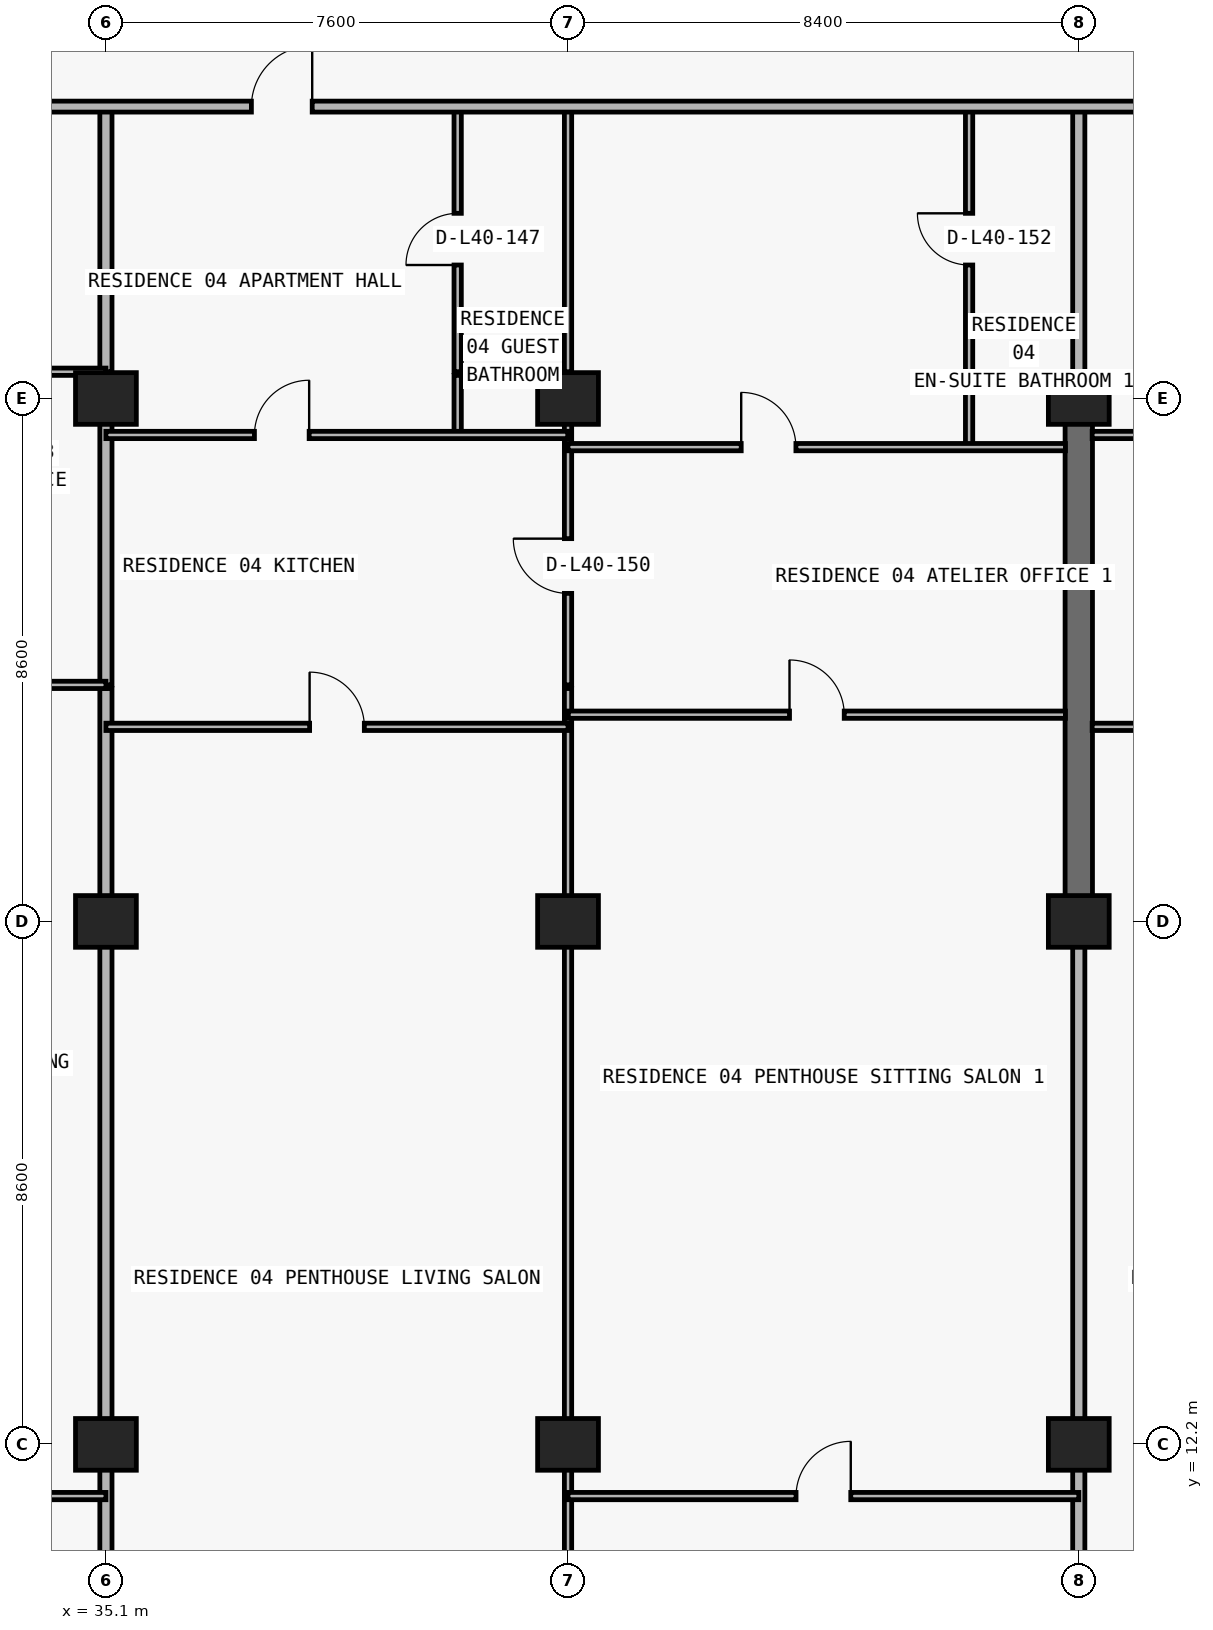
"""IFC4 building model, lengths in metres.
Left out: names, types, materials, properties, quantities, classifications, styles, units other than length and angle.
Written with IfcOpenShell. Run it as: python <this file> out.ifc"""

import sys

from ifc_helpers import new_model, si_unit, direction, frame, frame_2d, origin, origin_2d, place, context, subcontext, project, spatial, rectangle, extrude, element, fill, save


model = new_model("IFC4")
c1 = context("Model", 3, precision=1e-05, world=origin(), true_north=direction((0.0, 1.0)))
c2 = subcontext(c1, "Body", "Model", "MODEL_VIEW")
j1 = project(units=[si_unit("LENGTHUNIT", "METRE"), si_unit("PLANEANGLEUNIT", "RADIAN")], contexts=[c1])
p1 = place(None, origin())
s1 = spatial("IfcSite", under=j1, at=p1, CompositionType="ELEMENT")
p2 = place(p1, origin())
s2 = spatial("IfcBuilding", under=s1, at=p2, CompositionType="ELEMENT")
p3 = place(p2, frame((0.0, 0.0, 145.5)))
s3 = spatial("IfcBuildingStorey", under=s2, at=p3, CompositionType="ELEMENT", Elevation=145.5)
for number, where, z_axis, x_axis in (
    (1, (35.1, 12.2, 0.0), (0.0, 0.0, 1.0), (1.0, 0.0, 0.0)),
    (2, (42.7, 12.2, 0.0), (0.0, 0.0, 1.0), (1.0, 0.0, 0.0)),
    (3, (51.1, 12.2, 0.0), (0.0, 0.0, 1.0), (1.0, 0.0, 0.0)),
    (4, (35.1, 20.8, 0.0), (0.0, 0.0, 1.0), (1.0, 0.0, 0.0)),
    (5, (42.7, 20.8, 0.0), (0.0, 0.0, 1.0), (1.0, 0.0, 0.0)),
    (6, (51.1, 20.8, 0.0), (0.0, 0.0, 1.0), (1.0, 0.0, 0.0)),
    (7, (35.1, 29.4, 0.0), (0.0, 0.0, 1.0), (1.0, 0.0, 0.0)),
    (8, (42.7, 29.4, 0.0), (0.0, 0.0, 1.0), (1.0, 0.0, 0.0)),
    (9, (51.1, 29.4, 0.0), (0.0, 0.0, 1.0), (1.0, 0.0, 0.0)),
):
    element("IfcColumn", number, at=place(p3, frame(where, z_axis=z_axis, x_axis=x_axis)), inside=s3, PredefinedType="COLUMN", context=c2, shape_type="SweptSolid", body=[
        extrude(rectangle(XDim=1.0, YDim=0.85, at=origin_2d()), origin(), (0.0, 0.0, 1.0), 3.05),
    ])
p4 = place(p3, frame((51.1, 20.8, 0.0), z_axis=(0.0, 0.0, 1.0), x_axis=(0.0, 1.0, 0.0)))
e10 = element("IfcWall", 10, at=p4, inside=s3, PredefinedType="SHEAR", context=c2, shape_type="SweptSolid", body=[
    extrude(rectangle(XDim=8.6, YDim=0.45, at=frame_2d((4.3, 0.0))), origin(), (0.0, 0.0, 1.0), 3.05),
])
p5 = place(p3, frame((35.1, 8.84, 0.0), z_axis=(0.0, 0.0, 1.0), x_axis=(0.0, 1.0, 0.0)))
e11 = element("IfcWall", 11, at=p5, inside=s3, PredefinedType="PARTITIONING", context=c2, shape_type="SweptSolid", body=[
    extrude(rectangle(XDim=15.79, YDim=0.2, at=frame_2d((7.895, 0.0))), origin(), (0.0, 0.0, 1.0), 2.174),
])
p6 = place(p3, frame((35.1, 24.69, 0.0), z_axis=(0.0, 0.0, 1.0), x_axis=(0.0, 1.0, 0.0)))
e12 = element("IfcWall", 12, at=p6, inside=s3, PredefinedType="PARTITIONING", context=c2, shape_type="SweptSolid", body=[
    extrude(rectangle(XDim=5.09, YDim=0.2, at=frame_2d((2.545, 0.0))), origin(), (0.0, 0.0, 1.0), 2.174),
])
p7 = place(p3, frame((35.1, 29.84, 0.0), z_axis=(0.0, 0.0, 1.0), x_axis=(0.0, 1.0, 0.0)))
e13 = element("IfcWall", 13, at=p7, inside=s3, PredefinedType="PARTITIONING", context=c2, shape_type="SweptSolid", body=[
    extrude(rectangle(XDim=4.36, YDim=0.2, at=frame_2d((2.18, 0.0))), origin(), (0.0, 0.0, 1.0), 2.174),
])
p8 = place(p3, frame((40.885, 28.8, 0.0), z_axis=(0.0, 0.0, 1.0), x_axis=(0.0, 1.0, 0.0)))
e14 = element("IfcWall", 14, at=p8, inside=s3, PredefinedType="PARTITIONING", context=c2, shape_type="SweptSolid", body=[
    extrude(rectangle(XDim=0.98, YDim=0.12, at=frame_2d((0.49, 0.0))), origin(), (0.0, 0.0, 1.0), 3.05),
])
p9 = place(p3, frame((40.885, 29.84, 0.0), z_axis=(0.0, 0.0, 1.0), x_axis=(0.0, 1.0, 0.0)))
e15 = element("IfcWall", 15, at=p9, inside=s3, PredefinedType="PARTITIONING", context=c2, shape_type="SweptSolid", body=[
    extrude(rectangle(XDim=4.36, YDim=0.12, at=frame_2d((2.18, 0.0))), origin(), (0.0, 0.0, 1.0), 3.05),
])
p10 = place(p9, frame((1.755, 0.0, 0.0)))
e16 = element("IfcOpeningElement", 16, at=p10, cuts=e15, PredefinedType="OPENING", context=c2, shape_type="SweptSolid", body=[
    extrude(rectangle(XDim=0.85, YDim=2.1, at=frame_2d((0.425, 1.05))), frame((0.0, 0.07, 0.0), z_axis=(0.0, -1.0, 0.0), x_axis=(1.0, 0.0, 0.0)), (0.0, 0.0, 1.0), 0.14),
])
p11 = place(p3, frame((42.7, 8.84, 0.0), z_axis=(0.0, 0.0, 1.0), x_axis=(0.0, 1.0, 0.0)))
e17 = element("IfcWall", 17, at=p11, inside=s3, PredefinedType="PARTITIONING", context=c2, shape_type="SweptSolid", body=[
    extrude(rectangle(XDim=15.79, YDim=0.12, at=frame_2d((7.895, 0.0))), origin(), (0.0, 0.0, 1.0), 2.174),
])
p12 = place(p3, frame((42.7, 24.69, 0.0), z_axis=(0.0, 0.0, 1.0), x_axis=(0.0, 1.0, 0.0)))
e18 = element("IfcWall", 18, at=p12, inside=s3, PredefinedType="PARTITIONING", context=c2, shape_type="SweptSolid", body=[
    extrude(rectangle(XDim=5.09, YDim=0.12, at=frame_2d((2.545, 0.0))), origin(), (0.0, 0.0, 1.0), 2.174),
])
p13 = place(p12, frame((1.505, 0.0, 0.0)))
e19 = element("IfcOpeningElement", 19, at=p13, cuts=e18, PredefinedType="OPENING", context=c2, shape_type="SweptSolid", body=[
    extrude(rectangle(XDim=0.9, YDim=2.124, at=frame_2d((0.45, 1.062))), frame((0.0, 0.07, 0.0), z_axis=(0.0, -1.0, 0.0), x_axis=(1.0, 0.0, 0.0)), (0.0, 0.0, 1.0), 0.14),
])
p14 = place(p3, frame((42.7, 29.84, 0.0), z_axis=(0.0, 0.0, 1.0), x_axis=(0.0, 1.0, 0.0)))
e20 = element("IfcWall", 20, at=p14, inside=s3, PredefinedType="PARTITIONING", context=c2, shape_type="SweptSolid", body=[
    extrude(rectangle(XDim=4.36, YDim=0.12, at=frame_2d((2.18, 0.0))), origin(), (0.0, 0.0, 1.0), 2.174),
])
p15 = place(p3, frame((49.296, 28.6, 0.0), z_axis=(0.0, 0.0, 1.0), x_axis=(0.0, 1.0, 0.0)))
e21 = element("IfcWall", 21, at=p15, inside=s3, PredefinedType="PARTITIONING", context=c2, shape_type="SweptSolid", body=[
    extrude(rectangle(XDim=1.18, YDim=0.12, at=frame_2d((0.59, 0.0))), origin(), (0.0, 0.0, 1.0), 3.05),
])
p16 = place(p3, frame((49.296, 29.84, 0.0), z_axis=(0.0, 0.0, 1.0), x_axis=(0.0, 1.0, 0.0)))
e22 = element("IfcWall", 22, at=p16, inside=s3, PredefinedType="PARTITIONING", context=c2, shape_type="SweptSolid", body=[
    extrude(rectangle(XDim=4.36, YDim=0.12, at=frame_2d((2.18, 0.0))), origin(), (0.0, 0.0, 1.0), 3.05),
])
p17 = place(p16, frame((1.755, 0.0, 0.0)))
e23 = element("IfcOpeningElement", 23, at=p17, cuts=e22, PredefinedType="OPENING", context=c2, shape_type="SweptSolid", body=[
    extrude(rectangle(XDim=0.85, YDim=2.1, at=frame_2d((0.425, 1.05))), frame((0.0, 0.07, 0.0), z_axis=(0.0, -1.0, 0.0), x_axis=(1.0, 0.0, 0.0)), (0.0, 0.0, 1.0), 0.14),
])
p18 = place(p3, frame((51.1, 8.84, 0.0), z_axis=(0.0, 0.0, 1.0), x_axis=(0.0, 1.0, 0.0)))
e24 = element("IfcWall", 24, at=p18, inside=s3, PredefinedType="PARTITIONING", context=c2, shape_type="SweptSolid", body=[
    extrude(rectangle(XDim=11.955, YDim=0.2, at=frame_2d((5.978, 0.0))), origin(), (0.0, 0.0, 1.0), 2.174),
])
p19 = place(p3, frame((51.1, 29.405, 0.0), z_axis=(0.0, 0.0, 1.0), x_axis=(0.0, 1.0, 0.0)))
e25 = element("IfcWall", 25, at=p19, inside=s3, PredefinedType="PARTITIONING", context=c2, shape_type="SweptSolid", body=[
    extrude(rectangle(XDim=0.375, YDim=0.2, at=frame_2d((0.188, 0.0))), origin(), (0.0, 0.0, 1.0), 3.05),
])
p20 = place(p3, frame((51.1, 29.84, 0.0), z_axis=(0.0, 0.0, 1.0), x_axis=(0.0, 1.0, 0.0)))
e26 = element("IfcWall", 26, at=p20, inside=s3, PredefinedType="PARTITIONING", context=c2, shape_type="SweptSolid", body=[
    extrude(rectangle(XDim=4.36, YDim=0.2, at=frame_2d((2.18, 0.0))), origin(), (0.0, 0.0, 1.0), 2.335),
])
p21 = place(p3, frame((30.648, 11.35, 0.0), z_axis=(0.0, 0.0, 1.0), x_axis=(1.0, 0.0, 0.0)))
e27 = element("IfcWall", 27, at=p21, inside=s3, PredefinedType="PARTITIONING", context=c2, shape_type="SweptSolid", body=[
    extrude(rectangle(XDim=4.452, YDim=0.12, at=frame_2d((2.226, 0.0))), origin(), (0.0, 0.0, 1.0), 3.05),
])
p22 = place(p21, frame((1.776, 0.0, 0.0)))
e28 = element("IfcOpeningElement", 28, at=p22, cuts=e27, PredefinedType="OPENING", context=c2, shape_type="SweptSolid", body=[
    extrude(rectangle(XDim=0.9, YDim=2.15, at=frame_2d((0.45, 1.075))), frame((0.0, 0.07, 0.0), z_axis=(0.0, -1.0, 0.0), x_axis=(1.0, 0.0, 0.0)), (0.0, 0.0, 1.0), 0.14),
])
p23 = place(p3, frame((42.7, 11.35, 0.0), z_axis=(0.0, 0.0, 1.0), x_axis=(1.0, 0.0, 0.0)))
e29 = element("IfcWall", 29, at=p23, inside=s3, PredefinedType="PARTITIONING", context=c2, shape_type="SweptSolid", body=[
    extrude(rectangle(XDim=8.4, YDim=0.12, at=frame_2d((4.2, 0.0))), origin(), (0.0, 0.0, 1.0), 3.05),
])
p24 = place(p23, frame((3.75, 0.0, 0.0)))
e30 = element("IfcOpeningElement", 30, at=p24, cuts=e29, PredefinedType="OPENING", context=c2, shape_type="SweptSolid", body=[
    extrude(rectangle(XDim=0.9, YDim=2.15, at=frame_2d((0.45, 1.075))), frame((0.0, 0.07, 0.0), z_axis=(0.0, -1.0, 0.0), x_axis=(1.0, 0.0, 0.0)), (0.0, 0.0, 1.0), 0.14),
])
p25 = place(p3, frame((35.1, 24.0, 0.0), z_axis=(0.0, 0.0, 1.0), x_axis=(1.0, 0.0, 0.0)))
e31 = element("IfcWall", 31, at=p25, inside=s3, PredefinedType="PARTITIONING", context=c2, shape_type="SweptSolid", body=[
    extrude(rectangle(XDim=7.6, YDim=0.12, at=frame_2d((3.8, 0.0))), origin(), (0.0, 0.0, 1.0), 3.05),
])
p26 = place(p25, frame((3.35, 0.0, 0.0)))
e32 = element("IfcOpeningElement", 32, at=p26, cuts=e31, PredefinedType="OPENING", context=c2, shape_type="SweptSolid", body=[
    extrude(rectangle(XDim=0.9, YDim=2.15, at=frame_2d((0.45, 1.075))), frame((0.0, 0.07, 0.0), z_axis=(0.0, -1.0, 0.0), x_axis=(1.0, 0.0, 0.0)), (0.0, 0.0, 1.0), 0.14),
])
p27 = place(p3, frame((51.32, 24.0, 0.0), z_axis=(0.0, 0.0, 1.0), x_axis=(1.0, 0.0, 0.0)))
e33 = element("IfcWall", 33, at=p27, inside=s3, PredefinedType="PARTITIONING", context=c2, shape_type="SweptSolid", body=[
    extrude(rectangle(XDim=8.18, YDim=0.12, at=frame_2d((4.09, 0.0))), origin(), (0.0, 0.0, 1.0), 3.05),
])
p28 = place(p27, frame((1.33, 0.0, 0.0)))
e34 = element("IfcOpeningElement", 34, at=p28, cuts=e33, PredefinedType="OPENING", context=c2, shape_type="SweptSolid", body=[
    extrude(rectangle(XDim=0.9, YDim=2.15, at=frame_2d((0.45, 1.075))), frame((0.0, 0.07, 0.0), z_axis=(0.0, -1.0, 0.0), x_axis=(1.0, 0.0, 0.0)), (0.0, 0.0, 1.0), 0.14),
])
p29 = place(p3, frame((42.705, 24.2, 0.0), z_axis=(0.0, 0.0, 1.0), x_axis=(1.0, 0.0, 0.0)))
e35 = element("IfcWall", 35, at=p29, inside=s3, PredefinedType="PARTITIONING", context=c2, shape_type="SweptSolid", body=[
    extrude(rectangle(XDim=8.175, YDim=0.12, at=frame_2d((4.087, 0.0))), origin(), (0.0, 0.0, 1.0), 3.05),
])
p30 = place(p29, frame((3.637, 0.0, 0.0)))
e36 = element("IfcOpeningElement", 36, at=p30, cuts=e35, PredefinedType="OPENING", context=c2, shape_type="SweptSolid", body=[
    extrude(rectangle(XDim=0.9, YDim=2.15, at=frame_2d((0.45, 1.075))), frame((0.0, 0.07, 0.0), z_axis=(0.0, -1.0, 0.0), x_axis=(1.0, 0.0, 0.0)), (0.0, 0.0, 1.0), 0.14),
])
p31 = place(p3, frame((26.92, 24.69, 0.0), z_axis=(0.0, 0.0, 1.0), x_axis=(1.0, 0.0, 0.0)))
e37 = element("IfcWall", 37, at=p31, inside=s3, PredefinedType="PARTITIONING", context=c2, shape_type="SweptSolid", body=[
    extrude(rectangle(XDim=8.18, YDim=0.12, at=frame_2d((4.09, 0.0))), origin(), (0.0, 0.0, 1.0), 3.05),
])
p32 = place(p31, frame((1.414, 0.0, 0.0)))
e38 = element("IfcOpeningElement", 38, at=p32, cuts=e37, PredefinedType="OPENING", context=c2, shape_type="SweptSolid", body=[
    extrude(rectangle(XDim=0.9, YDim=2.15, at=frame_2d((0.45, 1.075))), frame((0.0, 0.07, 0.0), z_axis=(0.0, -1.0, 0.0), x_axis=(1.0, 0.0, 0.0)), (0.0, 0.0, 1.0), 0.14),
])
p33 = place(p31, frame((5.673, 0.0, 0.0)))
e39 = element("IfcOpeningElement", 39, at=p33, cuts=e37, PredefinedType="OPENING", context=c2, shape_type="SweptSolid", body=[
    extrude(rectangle(XDim=0.9, YDim=2.15, at=frame_2d((0.45, 1.075))), frame((0.0, 0.07, 0.0), z_axis=(0.0, -1.0, 0.0), x_axis=(1.0, 0.0, 0.0)), (0.0, 0.0, 1.0), 0.14),
])
p34 = place(p3, frame((42.7, 28.6, 0.0), z_axis=(0.0, 0.0, 1.0), x_axis=(1.0, 0.0, 0.0)))
e40 = element("IfcWall", 40, at=p34, inside=s3, PredefinedType="PARTITIONING", context=c2, shape_type="SweptSolid", body=[
    extrude(rectangle(XDim=8.18, YDim=0.12, at=frame_2d((4.09, 0.0))), origin(), (0.0, 0.0, 1.0), 3.05),
])
p35 = place(p34, frame((2.848, 0.0, 0.0)))
e41 = element("IfcOpeningElement", 41, at=p35, cuts=e40, PredefinedType="OPENING", context=c2, shape_type="SweptSolid", body=[
    extrude(rectangle(XDim=0.9, YDim=2.15, at=frame_2d((0.45, 1.075))), frame((0.0, 0.07, 0.0), z_axis=(0.0, -1.0, 0.0), x_axis=(1.0, 0.0, 0.0)), (0.0, 0.0, 1.0), 0.14),
])
p36 = place(p3, frame((35.1, 28.8, 0.0), z_axis=(0.0, 0.0, 1.0), x_axis=(1.0, 0.0, 0.0)))
e42 = element("IfcWall", 42, at=p36, inside=s3, PredefinedType="PARTITIONING", context=c2, shape_type="SweptSolid", body=[
    extrude(rectangle(XDim=7.595, YDim=0.12, at=frame_2d((3.797, 0.0))), origin(), (0.0, 0.0, 1.0), 3.05),
])
p37 = place(p36, frame((2.442, 0.0, 0.0)))
e43 = element("IfcOpeningElement", 43, at=p37, cuts=e42, PredefinedType="OPENING", context=c2, shape_type="SweptSolid", body=[
    extrude(rectangle(XDim=0.9, YDim=2.15, at=frame_2d((0.45, 1.075))), frame((0.0, 0.07, 0.0), z_axis=(0.0, -1.0, 0.0), x_axis=(1.0, 0.0, 0.0)), (0.0, 0.0, 1.0), 0.14),
])
p38 = place(p3, frame((51.32, 28.8, 0.0), z_axis=(0.0, 0.0, 1.0), x_axis=(1.0, 0.0, 0.0)))
e44 = element("IfcWall", 44, at=p38, inside=s3, PredefinedType="PARTITIONING", context=c2, shape_type="SweptSolid", body=[
    extrude(rectangle(XDim=8.18, YDim=0.12, at=frame_2d((4.09, 0.0))), origin(), (0.0, 0.0, 1.0), 3.05),
])
p39 = place(p38, frame((1.33, 0.0, 0.0)))
e45 = element("IfcOpeningElement", 45, at=p39, cuts=e44, PredefinedType="OPENING", context=c2, shape_type="SweptSolid", body=[
    extrude(rectangle(XDim=0.9, YDim=2.15, at=frame_2d((0.45, 1.075))), frame((0.0, 0.07, 0.0), z_axis=(0.0, -1.0, 0.0), x_axis=(1.0, 0.0, 0.0)), (0.0, 0.0, 1.0), 0.14),
])
p40 = place(p3, frame((26.7, 29.84, 0.0), z_axis=(0.0, 0.0, 1.0), x_axis=(1.0, 0.0, 0.0)))
e46 = element("IfcWall", 46, at=p40, inside=s3, PredefinedType="PARTITIONING", context=c2, shape_type="SweptSolid", body=[
    extrude(rectangle(XDim=8.4, YDim=0.12, at=frame_2d((4.2, 0.0))), origin(), (0.0, 0.0, 1.0), 3.05),
])
p41 = place(p40, frame((1.693, 0.0, 0.0)))
e47 = element("IfcOpeningElement", 47, at=p41, cuts=e46, PredefinedType="OPENING", context=c2, shape_type="SweptSolid", body=[
    extrude(rectangle(XDim=0.9, YDim=2.15, at=frame_2d((0.45, 1.075))), frame((0.0, 0.07, 0.0), z_axis=(0.0, -1.0, 0.0), x_axis=(1.0, 0.0, 0.0)), (0.0, 0.0, 1.0), 0.14),
])
p42 = place(p3, frame((26.7, 34.2, 0.0), z_axis=(0.0, 0.0, 1.0), x_axis=(1.0, 0.0, 0.0)))
e48 = element("IfcWall", 48, at=p42, inside=s3, PredefinedType="PARTITIONING", context=c2, shape_type="SweptSolid", body=[
    extrude(rectangle(XDim=32.8, YDim=0.18, at=frame_2d((16.4, 0.0))), origin(), (0.0, 0.0, 1.0), 3.05),
])
p43 = place(p42, frame((2.519, 0.0, 0.0)))
e49 = element("IfcOpeningElement", 49, at=p43, cuts=e48, PredefinedType="OPENING", context=c2, shape_type="SweptSolid", body=[
    extrude(rectangle(XDim=1.0, YDim=2.2, at=frame_2d((0.5, 1.1))), frame((0.0, 0.1, 0.0), z_axis=(0.0, -1.0, 0.0), x_axis=(1.0, 0.0, 0.0)), (0.0, 0.0, 1.0), 0.2),
])
p44 = place(p42, frame((10.792, 0.0, 0.0)))
e50 = element("IfcOpeningElement", 50, at=p44, cuts=e48, PredefinedType="OPENING", context=c2, shape_type="SweptSolid", body=[
    extrude(rectangle(XDim=1.0, YDim=2.2, at=frame_2d((0.5, 1.1))), frame((0.0, 0.1, 0.0), z_axis=(0.0, -1.0, 0.0), x_axis=(1.0, 0.0, 0.0)), (0.0, 0.0, 1.0), 0.2),
])
p45 = place(p42, frame((27.146, 0.0, 0.0)))
e51 = element("IfcOpeningElement", 51, at=p45, cuts=e48, PredefinedType="OPENING", context=c2, shape_type="SweptSolid", body=[
    extrude(rectangle(XDim=1.0, YDim=2.2, at=frame_2d((0.5, 1.1))), frame((0.0, 0.1, 0.0), z_axis=(0.0, -1.0, 0.0), x_axis=(1.0, 0.0, 0.0)), (0.0, 0.0, 1.0), 0.2),
])
p46 = place(p44, origin())
e52 = element("IfcDoor", 52, at=p46, inside=s3, OperationType="SINGLE_SWING_RIGHT", PredefinedType="DOOR", context=c2, shape_type="SweptSolid", body=[
    extrude(rectangle(XDim=1.0, YDim=2.2, at=frame_2d((0.5, 1.1))), frame((0.0, 0.025, 0.0), z_axis=(0.0, -1.0, 0.0), x_axis=(1.0, 0.0, 0.0)), (0.0, 0.0, 1.0), 0.05),
])
fill(e50, e52)
p47 = place(p10, origin())
e53 = element("IfcDoor", 53, at=p47, inside=s3, OperationType="SINGLE_SWING_LEFT", PredefinedType="DOOR", context=c2, shape_type="SweptSolid", body=[
    extrude(rectangle(XDim=0.85, YDim=2.1, at=frame_2d((0.425, 1.05))), frame((0.0, 0.025, 0.0), z_axis=(0.0, -1.0, 0.0), x_axis=(1.0, 0.0, 0.0)), (0.0, 0.0, 1.0), 0.05),
])
fill(e16, e53)
p48 = place(p37, origin())
e54 = element("IfcDoor", 54, at=p48, inside=s3, OperationType="SINGLE_SWING_RIGHT", PredefinedType="DOOR", context=c2, shape_type="SweptSolid", body=[
    extrude(rectangle(XDim=0.9, YDim=2.15, at=frame_2d((0.45, 1.075))), frame((0.0, 0.025, 0.0), z_axis=(0.0, -1.0, 0.0), x_axis=(1.0, 0.0, 0.0)), (0.0, 0.0, 1.0), 0.05),
])
fill(e43, e54)
p49 = place(p26, origin())
e55 = element("IfcDoor", 55, at=p49, inside=s3, OperationType="SINGLE_SWING_LEFT", PredefinedType="DOOR", context=c2, shape_type="SweptSolid", body=[
    extrude(rectangle(XDim=0.9, YDim=2.15, at=frame_2d((0.45, 1.075))), frame((0.0, 0.025, 0.0), z_axis=(0.0, -1.0, 0.0), x_axis=(1.0, 0.0, 0.0)), (0.0, 0.0, 1.0), 0.05),
])
fill(e32, e55)
p50 = place(p13, origin())
e56 = element("IfcDoor", 56, at=p50, inside=s3, OperationType="SINGLE_SWING_RIGHT", PredefinedType="DOOR", context=c2, shape_type="SweptSolid", body=[
    extrude(rectangle(XDim=0.9, YDim=2.124, at=frame_2d((0.45, 1.062))), frame((0.0, 0.025, 0.0), z_axis=(0.0, -1.0, 0.0), x_axis=(1.0, 0.0, 0.0)), (0.0, 0.0, 1.0), 0.05),
])
fill(e19, e56)
p51 = place(p35, origin())
e57 = element("IfcDoor", 57, at=p51, inside=s3, OperationType="SINGLE_SWING_LEFT", PredefinedType="DOOR", context=c2, shape_type="SweptSolid", body=[
    extrude(rectangle(XDim=0.9, YDim=2.15, at=frame_2d((0.45, 1.075))), frame((0.0, 0.025, 0.0), z_axis=(0.0, -1.0, 0.0), x_axis=(1.0, 0.0, 0.0)), (0.0, 0.0, 1.0), 0.05),
])
fill(e41, e57)
p52 = place(p17, origin())
e58 = element("IfcDoor", 58, at=p52, inside=s3, OperationType="SINGLE_SWING_RIGHT", PredefinedType="DOOR", context=c2, shape_type="SweptSolid", body=[
    extrude(rectangle(XDim=0.85, YDim=2.1, at=frame_2d((0.425, 1.05))), frame((0.0, 0.025, 0.0), z_axis=(0.0, -1.0, 0.0), x_axis=(1.0, 0.0, 0.0)), (0.0, 0.0, 1.0), 0.05),
])
fill(e23, e58)
p53 = place(p30, origin())
e59 = element("IfcDoor", 59, at=p53, inside=s3, OperationType="SINGLE_SWING_LEFT", PredefinedType="DOOR", context=c2, shape_type="SweptSolid", body=[
    extrude(rectangle(XDim=0.9, YDim=2.15, at=frame_2d((0.45, 1.075))), frame((0.0, 0.025, 0.0), z_axis=(0.0, -1.0, 0.0), x_axis=(1.0, 0.0, 0.0)), (0.0, 0.0, 1.0), 0.05),
])
fill(e36, e59)
p54 = place(p24, origin())
e60 = element("IfcDoor", 60, at=p54, inside=s3, OperationType="SINGLE_SWING_RIGHT", PredefinedType="DOOR", context=c2, shape_type="SweptSolid", body=[
    extrude(rectangle(XDim=0.9, YDim=2.15, at=frame_2d((0.45, 1.075))), frame((0.0, 0.025, 0.0), z_axis=(0.0, -1.0, 0.0), x_axis=(1.0, 0.0, 0.0)), (0.0, 0.0, 1.0), 0.05),
])
fill(e30, e60)
save(model, sys.argv[1])
